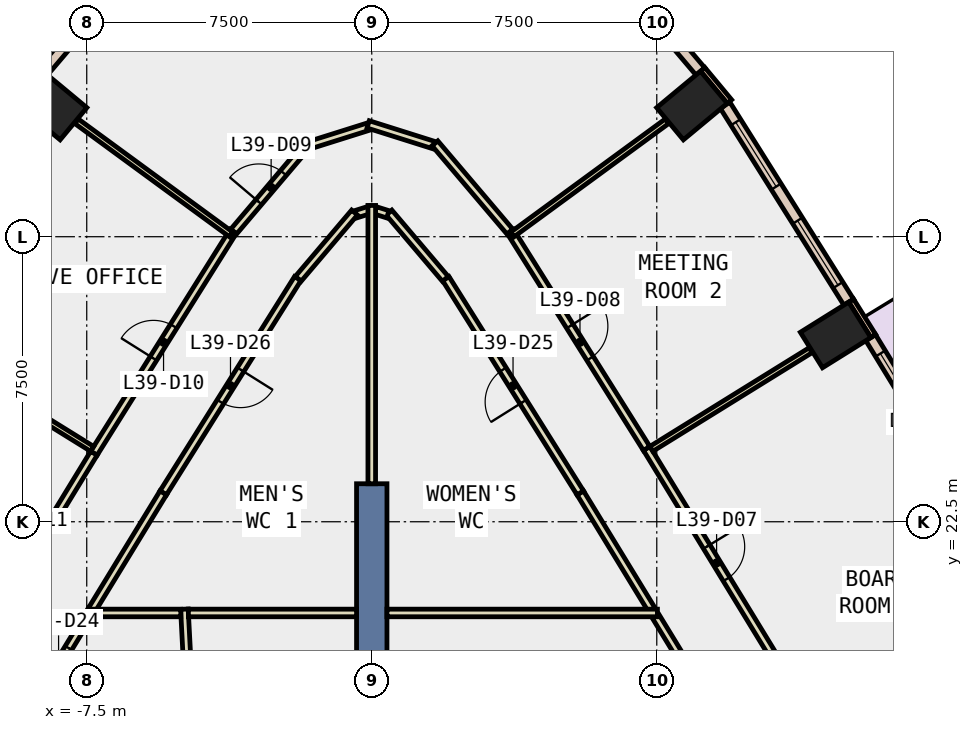
"""IFC4 building model, lengths in metres.
Left out: names, types, materials, properties, quantities, classifications, styles, units other than length and angle.
Written with IfcOpenShell. Run it as: python <this file> out.ifc"""

import sys

from ifc_helpers import new_model, si_unit, direction, frame, frame_2d, origin, origin_2d, place, context, subcontext, project, spatial, rectangle, extrude, element, fill, save


model = new_model("IFC4")
c1 = context("Model", 3, precision=1e-05, world=origin(), true_north=direction((0.0, 1.0)))
c2 = subcontext(c1, "Body", "Model", "MODEL_VIEW")
j1 = project(units=[si_unit("LENGTHUNIT", "METRE"), si_unit("PLANEANGLEUNIT", "RADIAN")], contexts=[c1])
p1 = place(None, origin())
s1 = spatial("IfcSite", under=j1, at=p1, CompositionType="ELEMENT")
p2 = place(p1, origin())
s2 = spatial("IfcBuilding", under=s1, at=p2, CompositionType="ELEMENT")
p3 = place(p2, frame((0.0, 0.0, 176.0)))
s3 = spatial("IfcBuildingStorey", under=s2, at=p3, CompositionType="ELEMENT", Elevation=176.0)
for number, where, z_axis, x_axis in (
    (1, (12.206, 27.416, -0.4), (0.0, 0.0, 1.0), (-0.53, 0.848, 0.0)),
    (2, (8.426, 33.452, -0.4), (0.0, 0.0, 1.0), (-0.639, 0.769, 0.0)),
    (3, (-8.426, 33.452, -0.4), (0.0, 0.0, 1.0), (0.639, 0.769, 0.0)),
):
    element("IfcColumn", number, at=place(p3, frame(where, z_axis=z_axis, x_axis=x_axis)), inside=s3, PredefinedType="COLUMN", context=c2, shape_type="SweptSolid", body=[
        extrude(rectangle(XDim=1.1, YDim=1.5, at=origin_2d()), origin(), (0.0, 0.0, 1.0), 4.2),
    ])
p4 = place(p3, frame((0.0, 14.5, -0.4), z_axis=(0.0, 0.0, 1.0), x_axis=(0.0, 1.0, 0.0)))
e4 = element("IfcWall", 4, at=p4, inside=s3, PredefinedType="SHEAR", context=c2, shape_type="SweptSolid", body=[
    extrude(rectangle(XDim=9.0, YDim=0.8, at=frame_2d((4.5, 0.0))), origin(), (0.0, 0.0, 1.0), 4.2),
])
p5 = place(p3, frame((13.197, 27.387, 0.0), z_axis=(0.0, 0.0, 1.0), x_axis=(-0.529879262372, 0.848073090782, 0.0)))
e5 = element("IfcWall", 5, at=p5, inside=s3, PredefinedType="STANDARD", context=c2, shape_type="SweptSolid", body=[
    extrude(rectangle(XDim=1.1, YDim=0.15, at=frame_2d((0.55, 0.0))), origin(), (0.0, 0.0, 1.0), 3.8),
])
p6 = place(p3, frame((9.412, 33.556, 0.0), z_axis=(0.0, 0.0, 1.0), x_axis=(-0.639092407347, 0.769129959676, 0.0)))
e6 = element("IfcWall", 6, at=p6, inside=s3, PredefinedType="STANDARD", context=c2, shape_type="SweptSolid", body=[
    extrude(rectangle(XDim=1.1, YDim=0.15, at=frame_2d((0.55, 0.0))), origin(), (0.0, 0.0, 1.0), 3.8),
])
p7 = place(p3, frame((16.24, 22.25, 0.0), z_axis=(0.0, 0.0, 1.0), x_axis=(-0.521263083766, 0.8533960379, 0.0)))
e7 = element("IfcWall", 7, at=p7, inside=s3, PredefinedType="STANDARD", context=c2, shape_type="SweptSolid", body=[
    extrude(rectangle(XDim=5.97, YDim=0.3, at=frame_2d((2.985, 0.0))), origin(), (0.0, 0.0, 1.0), 3.8),
])
p8 = place(p7, frame((0.493, 0.0, 0.0)))
e8 = element("IfcOpeningElement", 8, at=p8, cuts=e7, PredefinedType="OPENING", context=c2, shape_type="SweptSolid", body=[
    extrude(rectangle(XDim=2.0, YDim=2.4, at=frame_2d((1.0, 1.2))), frame((0.0, 0.16, 0.0), z_axis=(0.0, -1.0, 0.0), x_axis=(1.0, 0.0, 0.0)), (0.0, 0.0, 1.0), 0.32),
])
p9 = place(p7, frame((3.478, 0.0, 0.9)))
e9 = element("IfcOpeningElement", 9, at=p9, cuts=e7, PredefinedType="OPENING", context=c2, shape_type="SweptSolid", body=[
    extrude(rectangle(XDim=2.0, YDim=2.6, at=frame_2d((1.0, 1.3))), frame((0.0, 0.16, 0.0), z_axis=(0.0, -1.0, 0.0), x_axis=(1.0, 0.0, 0.0)), (0.0, 0.0, 1.0), 0.32),
])
p10 = place(p3, frame((12.55, 28.279, 0.0), z_axis=(0.0, 0.0, 1.0), x_axis=(-0.531816047834, 0.846859900613, 0.0)))
e10 = element("IfcWall", 10, at=p10, inside=s3, PredefinedType="STANDARD", context=c2, shape_type="SweptSolid", body=[
    extrude(rectangle(XDim=6.119, YDim=0.3, at=frame_2d((3.06, 0.0))), origin(), (0.0, 0.0, 1.0), 3.8),
])
p11 = place(p10, frame((0.53, 0.0, 0.9)))
e11 = element("IfcOpeningElement", 11, at=p11, cuts=e10, PredefinedType="OPENING", context=c2, shape_type="SweptSolid", body=[
    extrude(rectangle(XDim=2.0, YDim=2.6, at=frame_2d((1.0, 1.3))), frame((0.0, 0.16, 0.0), z_axis=(0.0, -1.0, 0.0), x_axis=(1.0, 0.0, 0.0)), (0.0, 0.0, 1.0), 0.32),
])
p12 = place(p10, frame((3.589, 0.0, 0.9)))
e12 = element("IfcOpeningElement", 12, at=p12, cuts=e10, PredefinedType="OPENING", context=c2, shape_type="SweptSolid", body=[
    extrude(rectangle(XDim=2.0, YDim=2.6, at=frame_2d((1.0, 1.3))), frame((0.0, 0.16, 0.0), z_axis=(0.0, -1.0, 0.0), x_axis=(1.0, 0.0, 0.0)), (0.0, 0.0, 1.0), 0.32),
])
p13 = place(p3, frame((8.647, 34.35, 0.0), z_axis=(0.0, 0.0, 1.0), x_axis=(-0.647156077277, 0.76235753531, 0.0)))
e13 = element("IfcWall", 13, at=p13, inside=s3, PredefinedType="STANDARD", context=c2, shape_type="SweptSolid", body=[
    extrude(rectangle(XDim=4.262, YDim=0.3, at=frame_2d((2.131, 0.0))), origin(), (0.0, 0.0, 1.0), 3.8),
])
p14 = place(p13, frame((1.431, 0.0, 0.9)))
e14 = element("IfcOpeningElement", 14, at=p14, cuts=e13, PredefinedType="OPENING", context=c2, shape_type="SweptSolid", body=[
    extrude(rectangle(XDim=1.4, YDim=2.6, at=frame_2d((0.7, 1.3))), frame((0.0, 0.16, 0.0), z_axis=(0.0, -1.0, 0.0), x_axis=(1.0, 0.0, 0.0)), (0.0, 0.0, 1.0), 0.32),
])
p15 = place(p3, frame((-5.889, 37.599, 0.0), z_axis=(0.0, 0.0, 1.0), x_axis=(-0.647156077277, -0.76235753531, 0.0)))
e15 = element("IfcWall", 15, at=p15, inside=s3, PredefinedType="STANDARD", context=c2, shape_type="SweptSolid", body=[
    extrude(rectangle(XDim=4.262, YDim=0.3, at=frame_2d((2.131, 0.0))), origin(), (0.0, 0.0, 1.0), 3.8),
])
p16 = place(p15, frame((1.431, 0.0, 0.9)))
e16 = element("IfcOpeningElement", 16, at=p16, cuts=e15, PredefinedType="OPENING", context=c2, shape_type="SweptSolid", body=[
    extrude(rectangle(XDim=1.4, YDim=2.6, at=frame_2d((0.7, 1.3))), frame((0.0, 0.16, 0.0), z_axis=(0.0, -1.0, 0.0), x_axis=(1.0, 0.0, 0.0)), (0.0, 0.0, 1.0), 0.32),
])
p17 = place(p3, frame((9.116, 17.319, 0.0), z_axis=(0.0, 0.0, 1.0), x_axis=(-0.521343721083, 0.853346778565, 0.0)))
e17 = element("IfcWall", 17, at=p17, inside=s3, PredefinedType="PARTITIONING", context=c2, shape_type="SweptSolid", body=[
    extrude(rectangle(XDim=3.159, YDim=0.2, at=frame_2d((1.58, 0.0))), origin(), (0.0, 0.0, 1.0), 3.75),
])
p18 = place(p3, frame((-7.365, 20.185, 0.0), z_axis=(0.0, 0.0, 1.0), x_axis=(-0.521352973407, -0.853341125881, 0.0)))
e18 = element("IfcWall", 18, at=p18, inside=s3, PredefinedType="PARTITIONING", context=c2, shape_type="SweptSolid", body=[
    extrude(rectangle(XDim=3.359, YDim=0.2, at=frame_2d((1.679, 0.0))), origin(), (0.0, 0.0, 1.0), 3.75),
])
p19 = place(p18, frame((1.18, 0.0, 0.0)))
e19 = element("IfcOpeningElement", 19, at=p19, cuts=e18, PredefinedType="OPENING", context=c2, shape_type="SweptSolid", body=[
    extrude(rectangle(XDim=1.0, YDim=2.1, at=frame_2d((0.5, 1.05))), frame((0.0, 0.11, 0.0), z_axis=(0.0, -1.0, 0.0), x_axis=(1.0, 0.0, 0.0)), (0.0, 0.0, 1.0), 0.22),
])
p20 = place(p3, frame((7.365, 20.185, 0.0), z_axis=(0.0, 0.0, 1.0), x_axis=(-0.521206053955, 0.853430869679, 0.0)))
e20 = element("IfcWall", 20, at=p20, inside=s3, PredefinedType="PARTITIONING", context=c2, shape_type="SweptSolid", body=[
    extrude(rectangle(XDim=3.603, YDim=0.2, at=frame_2d((1.802, 0.0))), origin(), (0.0, 0.0, 1.0), 3.75),
])
p21 = place(p3, frame((5.487, 23.26, 0.0), z_axis=(0.0, 0.0, 1.0), x_axis=(-0.531656179122, 0.846960274866, 0.0)))
e21 = element("IfcWall", 21, at=p21, inside=s3, PredefinedType="PARTITIONING", context=c2, shape_type="SweptSolid", body=[
    extrude(rectangle(XDim=6.657, YDim=0.2, at=frame_2d((3.328, 0.0))), origin(), (0.0, 0.0, 1.0), 3.75),
])
p22 = place(p21, frame((2.828, 0.0, 0.0)))
e22 = element("IfcOpeningElement", 22, at=p22, cuts=e21, PredefinedType="OPENING", context=c2, shape_type="SweptSolid", body=[
    extrude(rectangle(XDim=1.0, YDim=2.1, at=frame_2d((0.5, 1.05))), frame((0.0, 0.11, 0.0), z_axis=(0.0, -1.0, 0.0), x_axis=(1.0, 0.0, 0.0)), (0.0, 0.0, 1.0), 0.22),
])
p23 = place(p3, frame((1.936, 28.89, 0.0), z_axis=(0.0, 0.0, 1.0), x_axis=(-0.647388540773, 0.762160138866, 0.0)))
e23 = element("IfcWall", 23, at=p23, inside=s3, PredefinedType="PARTITIONING", context=c2, shape_type="SweptSolid", body=[
    extrude(rectangle(XDim=2.291, YDim=0.2, at=frame_2d((1.146, 0.0))), origin(), (0.0, 0.0, 1.0), 3.75),
])
p24 = place(p3, frame((0.423, 30.59, 0.0), z_axis=(0.0, 0.0, 1.0), x_axis=(-0.954074901128, 0.29956816092, 0.0)))
e24 = element("IfcWall", 24, at=p24, inside=s3, PredefinedType="PARTITIONING", context=c2, shape_type="SweptSolid", body=[
    extrude(rectangle(XDim=0.344, YDim=0.2, at=frame_2d((0.172, 0.0))), origin(), (0.0, 0.0, 1.0), 3.75),
])
p25 = place(p3, frame((-0.048, 30.708, 0.0), z_axis=(0.0, 0.0, 1.0), x_axis=(-0.953948026088, -0.299971937891, 0.0)))
e25 = element("IfcWall", 25, at=p25, inside=s3, PredefinedType="PARTITIONING", context=c2, shape_type="SweptSolid", body=[
    extrude(rectangle(XDim=0.393, YDim=0.2, at=frame_2d((0.197, 0.0))), origin(), (0.0, 0.0, 1.0), 3.75),
])
p26 = place(p3, frame((-0.453, 30.636, 0.0), z_axis=(0.0, 0.0, 1.0), x_axis=(-0.647388540773, -0.762160138866, 0.0)))
e26 = element("IfcWall", 26, at=p26, inside=s3, PredefinedType="PARTITIONING", context=c2, shape_type="SweptSolid", body=[
    extrude(rectangle(XDim=2.291, YDim=0.2, at=frame_2d((1.146, 0.0))), origin(), (0.0, 0.0, 1.0), 3.75),
])
p27 = place(p3, frame((-1.948, 28.898, 0.0), z_axis=(0.0, 0.0, 1.0), x_axis=(-0.531656179122, -0.846960274866, 0.0)))
e27 = element("IfcWall", 27, at=p27, inside=s3, PredefinedType="PARTITIONING", context=c2, shape_type="SweptSolid", body=[
    extrude(rectangle(XDim=6.657, YDim=0.2, at=frame_2d((3.328, 0.0))), origin(), (0.0, 0.0, 1.0), 3.75),
])
p28 = place(p27, frame((2.828, 0.0, 0.0)))
e28 = element("IfcOpeningElement", 28, at=p28, cuts=e27, PredefinedType="OPENING", context=c2, shape_type="SweptSolid", body=[
    extrude(rectangle(XDim=1.0, YDim=2.1, at=frame_2d((0.5, 1.05))), frame((0.0, 0.11, 0.0), z_axis=(0.0, -1.0, 0.0), x_axis=(1.0, 0.0, 0.0)), (0.0, 0.0, 1.0), 0.22),
])
p29 = place(p3, frame((-5.487, 23.26, 0.0), z_axis=(0.0, 0.0, 1.0), x_axis=(-0.521206053955, -0.853430869679, 0.0)))
e29 = element("IfcWall", 29, at=p29, inside=s3, PredefinedType="PARTITIONING", context=c2, shape_type="SweptSolid", body=[
    extrude(rectangle(XDim=3.603, YDim=0.2, at=frame_2d((1.802, 0.0))), origin(), (0.0, 0.0, 1.0), 3.75),
])
p30 = place(p3, frame((7.234, 24.43, 0.0), z_axis=(0.0, 0.0, 1.0), x_axis=(0.521189922749, -0.853440721096, 0.0)))
e30 = element("IfcWall", 30, at=p30, inside=s3, PredefinedType="PARTITIONING", context=c2, shape_type="SweptSolid", body=[
    extrude(rectangle(XDim=7.063, YDim=0.2, at=frame_2d((3.531, 0.0))), origin(), (0.0, 0.0, 1.0), 3.75),
])
p31 = place(p30, frame((3.031, 0.0, 0.0)))
e31 = element("IfcOpeningElement", 31, at=p31, cuts=e30, PredefinedType="OPENING", context=c2, shape_type="SweptSolid", body=[
    extrude(rectangle(XDim=1.0, YDim=2.1, at=frame_2d((0.5, 1.05))), frame((0.0, 0.11, 0.0), z_axis=(0.0, -1.0, 0.0), x_axis=(1.0, 0.0, 0.0)), (0.0, 0.0, 1.0), 0.22),
])
p32 = place(p3, frame((3.646, 30.142, 0.0), z_axis=(0.0, 0.0, 1.0), x_axis=(0.531621424046, -0.846982090422, 0.0)))
e32 = element("IfcWall", 32, at=p32, inside=s3, PredefinedType="PARTITIONING", context=c2, shape_type="SweptSolid", body=[
    extrude(rectangle(XDim=6.745, YDim=0.2, at=frame_2d((3.373, 0.0))), origin(), (0.0, 0.0, 1.0), 3.75),
])
p33 = place(p32, frame((2.948, 0.0, 0.0)))
e33 = element("IfcOpeningElement", 33, at=p33, cuts=e32, PredefinedType="OPENING", context=c2, shape_type="SweptSolid", body=[
    extrude(rectangle(XDim=1.0, YDim=2.1, at=frame_2d((0.5, 1.05))), frame((0.0, 0.11, 0.0), z_axis=(0.0, -1.0, 0.0), x_axis=(1.0, 0.0, 0.0)), (0.0, 0.0, 1.0), 0.22),
])
p34 = place(p3, frame((-3.634, 30.134, 0.0), z_axis=(0.0, 0.0, 1.0), x_axis=(0.647148242723, 0.762364185899, 0.0)))
e34 = element("IfcWall", 34, at=p34, inside=s3, PredefinedType="PARTITIONING", context=c2, shape_type="SweptSolid", body=[
    extrude(rectangle(XDim=3.047, YDim=0.2, at=frame_2d((1.523, 0.0))), origin(), (0.0, 0.0, 1.0), 3.75),
])
p35 = place(p34, frame((1.024, 0.0, 0.0)))
e35 = element("IfcOpeningElement", 35, at=p35, cuts=e34, PredefinedType="OPENING", context=c2, shape_type="SweptSolid", body=[
    extrude(rectangle(XDim=1.0, YDim=2.1, at=frame_2d((0.5, 1.05))), frame((0.0, 0.11, 0.0), z_axis=(0.0, -1.0, 0.0), x_axis=(1.0, 0.0, 0.0)), (0.0, 0.0, 1.0), 0.22),
])
p36 = place(p3, frame((-1.632, 32.411, 0.0), z_axis=(0.0, 0.0, 1.0), x_axis=(0.953809064266, 0.300413496575, 0.0)))
e36 = element("IfcWall", 36, at=p36, inside=s3, PredefinedType="PARTITIONING", context=c2, shape_type="SweptSolid", body=[
    extrude(rectangle(XDim=1.612, YDim=0.2, at=frame_2d((0.806, 0.0))), origin(), (0.0, 0.0, 1.0), 3.75),
])
p37 = place(p3, frame((-0.095, 32.956, 0.0), z_axis=(0.0, 0.0, 1.0), x_axis=(0.953617294109, -0.301021687552, 0.0)))
e37 = element("IfcWall", 37, at=p37, inside=s3, PredefinedType="PARTITIONING", context=c2, shape_type="SweptSolid", body=[
    extrude(rectangle(XDim=1.811, YDim=0.2, at=frame_2d((0.906, 0.0))), origin(), (0.0, 0.0, 1.0), 3.75),
])
p38 = place(p3, frame((1.662, 32.457, 0.0), z_axis=(0.0, 0.0, 1.0), x_axis=(0.647148242723, -0.762364185899, 0.0)))
e38 = element("IfcWall", 38, at=p38, inside=s3, PredefinedType="PARTITIONING", context=c2, shape_type="SweptSolid", body=[
    extrude(rectangle(XDim=3.047, YDim=0.2, at=frame_2d((1.523, 0.0))), origin(), (0.0, 0.0, 1.0), 3.75),
])
p39 = place(p3, frame((-7.312, 24.302, 0.0), z_axis=(0.0, 0.0, 1.0), x_axis=(0.53166241737, 0.846956358944, 0.0)))
e39 = element("IfcWall", 39, at=p39, inside=s3, PredefinedType="PARTITIONING", context=c2, shape_type="SweptSolid", body=[
    extrude(rectangle(XDim=6.895, YDim=0.2, at=frame_2d((3.448, 0.0))), origin(), (0.0, 0.0, 1.0), 3.75),
])
p40 = place(p39, frame((2.948, 0.0, 0.0)))
e40 = element("IfcOpeningElement", 40, at=p40, cuts=e39, PredefinedType="OPENING", context=c2, shape_type="SweptSolid", body=[
    extrude(rectangle(XDim=1.0, YDim=2.1, at=frame_2d((0.5, 1.05))), frame((0.0, 0.11, 0.0), z_axis=(0.0, -1.0, 0.0), x_axis=(1.0, 0.0, 0.0)), (0.0, 0.0, 1.0), 0.22),
])
p41 = place(p3, frame((-10.915, 18.402, 0.0), z_axis=(0.0, 0.0, 1.0), x_axis=(0.521189997761, 0.853440675287, 0.0)))
e41 = element("IfcWall", 41, at=p41, inside=s3, PredefinedType="PARTITIONING", context=c2, shape_type="SweptSolid", body=[
    extrude(rectangle(XDim=6.913, YDim=0.2, at=frame_2d((3.457, 0.0))), origin(), (0.0, 0.0, 1.0), 3.75),
])
p42 = place(p41, frame((3.031, 0.0, 0.0)))
e42 = element("IfcOpeningElement", 42, at=p42, cuts=e41, PredefinedType="OPENING", context=c2, shape_type="SweptSolid", body=[
    extrude(rectangle(XDim=1.0, YDim=2.1, at=frame_2d((0.5, 1.05))), frame((0.0, 0.11, 0.0), z_axis=(0.0, -1.0, 0.0), x_axis=(1.0, 0.0, 0.0)), (0.0, 0.0, 1.0), 0.22),
])
p43 = place(p3, frame((-4.632, 14.488, 0.0), z_axis=(0.0, 0.0, 1.0), x_axis=(-0.052074913706, 0.998643181203, 0.0)))
e43 = element("IfcWall", 43, at=p43, inside=s3, PredefinedType="PARTITIONING", context=c2, shape_type="SweptSolid", body=[
    extrude(rectangle(XDim=5.72, YDim=0.2, at=frame_2d((2.86, 0.0))), origin(), (0.0, 0.0, 1.0), 3.75),
])
p44 = place(p3, frame((0.4, 20.1, 0.0), z_axis=(0.0, 0.0, 1.0), x_axis=(1.0, 0.0, 0.0)))
e44 = element("IfcWall", 44, at=p44, inside=s3, PredefinedType="PARTITIONING", context=c2, shape_type="SweptSolid", body=[
    extrude(rectangle(XDim=7.117, YDim=0.2, at=frame_2d((3.559, 0.0))), origin(), (0.0, 0.0, 1.0), 3.75),
])
p45 = place(p3, frame((-4.825, 20.1, 0.0), z_axis=(0.0, 0.0, 1.0), x_axis=(1.0, 0.0, 0.0)))
e45 = element("IfcWall", 45, at=p45, inside=s3, PredefinedType="PARTITIONING", context=c2, shape_type="SweptSolid", body=[
    extrude(rectangle(XDim=4.425, YDim=0.2, at=frame_2d((2.212, 0.0))), origin(), (0.0, 0.0, 1.0), 3.75),
])
p46 = place(p3, frame((-7.317, 20.1, 0.0), z_axis=(0.0, 0.0, 1.0), x_axis=(1.0, 0.0, 0.0)))
e46 = element("IfcWall", 46, at=p46, inside=s3, PredefinedType="PARTITIONING", context=c2, shape_type="SweptSolid", body=[
    extrude(rectangle(XDim=2.292, YDim=0.2, at=frame_2d((1.146, 0.0))), origin(), (0.0, 0.0, 1.0), 3.75),
])
p47 = place(p3, frame((0.0, 23.5, 0.0), z_axis=(0.0, 0.0, 1.0), x_axis=(0.0, 1.0, 0.0)))
e47 = element("IfcWall", 47, at=p47, inside=s3, PredefinedType="PARTITIONING", context=c2, shape_type="SweptSolid", body=[
    extrude(rectangle(XDim=7.323, YDim=0.2, at=frame_2d((3.662, 0.0))), origin(), (0.0, 0.0, 1.0), 3.75),
])
p48 = place(p3, frame((7.358, 24.418, 0.0), z_axis=(0.0, 0.0, 1.0), x_axis=(0.850136365231, 0.526562589358, 0.0)))
e48 = element("IfcWall", 48, at=p48, inside=s3, PredefinedType="PARTITIONING", context=c2, shape_type="SweptSolid", body=[
    extrude(rectangle(XDim=4.93, YDim=0.15, at=frame_2d((2.465, 0.0))), origin(), (0.0, 0.0, 1.0), 3.75),
])
for number, where, z_axis, x_axis in (
    (49, (3.699, 30.058, 0.0), (0.0, 0.0, 1.0), (0.807, 0.591, 0.0)),
    (50, (-3.699, 30.058, 0.0), (0.0, 0.0, 1.0), (-0.807, 0.591, 0.0)),
):
    element("IfcWall", number, at=place(p3, frame(where, z_axis=z_axis, x_axis=x_axis)), inside=s3, PredefinedType="PARTITIONING", context=c2, shape_type="SweptSolid", body=[
        extrude(rectangle(XDim=5.044, YDim=0.15, at=frame_2d((2.522, 0.0))), origin(), (0.0, 0.0, 1.0), 3.75),
    ])
p49 = place(p3, frame((-7.358, 24.418, 0.0), z_axis=(0.0, 0.0, 1.0), x_axis=(-0.850136365231, 0.526562589358, 0.0)))
e51 = element("IfcWall", 51, at=p49, inside=s3, PredefinedType="PARTITIONING", context=c2, shape_type="SweptSolid", body=[
    extrude(rectangle(XDim=4.93, YDim=0.15, at=frame_2d((2.465, 0.0))), origin(), (0.0, 0.0, 1.0), 3.75),
])
p50 = place(p9, origin())
e52 = element("IfcWindow", 52, at=p50, inside=s3, PartitioningType="SINGLE_PANEL", PredefinedType="WINDOW", context=c2, shape_type="SweptSolid", body=[
    extrude(rectangle(XDim=2.0, YDim=2.6, at=frame_2d((1.0, 1.3))), frame((0.0, 0.03, 0.0), z_axis=(0.0, -1.0, 0.0), x_axis=(1.0, 0.0, 0.0)), (0.0, 0.0, 1.0), 0.06),
])
fill(e9, e52)
p51 = place(p11, origin())
e53 = element("IfcWindow", 53, at=p51, inside=s3, PartitioningType="SINGLE_PANEL", PredefinedType="WINDOW", context=c2, shape_type="SweptSolid", body=[
    extrude(rectangle(XDim=2.0, YDim=2.6, at=frame_2d((1.0, 1.3))), frame((0.0, 0.03, 0.0), z_axis=(0.0, -1.0, 0.0), x_axis=(1.0, 0.0, 0.0)), (0.0, 0.0, 1.0), 0.06),
])
fill(e11, e53)
p52 = place(p12, origin())
e54 = element("IfcWindow", 54, at=p52, inside=s3, PartitioningType="SINGLE_PANEL", PredefinedType="WINDOW", context=c2, shape_type="SweptSolid", body=[
    extrude(rectangle(XDim=2.0, YDim=2.6, at=frame_2d((1.0, 1.3))), frame((0.0, 0.03, 0.0), z_axis=(0.0, -1.0, 0.0), x_axis=(1.0, 0.0, 0.0)), (0.0, 0.0, 1.0), 0.06),
])
fill(e12, e54)
p53 = place(p31, origin())
e55 = element("IfcDoor", 55, at=p53, inside=s3, OperationType="SINGLE_SWING_RIGHT", PredefinedType="DOOR", context=c2, shape_type="SweptSolid", body=[
    extrude(rectangle(XDim=1.0, YDim=2.1, at=frame_2d((0.5, 1.05))), frame((0.0, 0.025, 0.0), z_axis=(0.0, -1.0, 0.0), x_axis=(1.0, 0.0, 0.0)), (0.0, 0.0, 1.0), 0.05),
])
fill(e31, e55)
p54 = place(p33, origin())
e56 = element("IfcDoor", 56, at=p54, inside=s3, OperationType="SINGLE_SWING_LEFT", PredefinedType="DOOR", context=c2, shape_type="SweptSolid", body=[
    extrude(rectangle(XDim=1.0, YDim=2.1, at=frame_2d((0.5, 1.05))), frame((0.0, 0.025, 0.0), z_axis=(0.0, -1.0, 0.0), x_axis=(1.0, 0.0, 0.0)), (0.0, 0.0, 1.0), 0.05),
])
fill(e33, e56)
p55 = place(p35, origin())
e57 = element("IfcDoor", 57, at=p55, inside=s3, OperationType="SINGLE_SWING_LEFT", PredefinedType="DOOR", context=c2, shape_type="SweptSolid", body=[
    extrude(rectangle(XDim=1.0, YDim=2.1, at=frame_2d((0.5, 1.05))), frame((0.0, 0.025, 0.0), z_axis=(0.0, -1.0, 0.0), x_axis=(1.0, 0.0, 0.0)), (0.0, 0.0, 1.0), 0.05),
])
fill(e35, e57)
p56 = place(p40, origin())
e58 = element("IfcDoor", 58, at=p56, inside=s3, OperationType="SINGLE_SWING_LEFT", PredefinedType="DOOR", context=c2, shape_type="SweptSolid", body=[
    extrude(rectangle(XDim=1.0, YDim=2.1, at=frame_2d((0.5, 1.05))), frame((0.0, 0.025, 0.0), z_axis=(0.0, -1.0, 0.0), x_axis=(1.0, 0.0, 0.0)), (0.0, 0.0, 1.0), 0.05),
])
fill(e40, e58)
p57 = place(p19, origin())
e59 = element("IfcDoor", 59, at=p57, inside=s3, OperationType="SINGLE_SWING_LEFT", PredefinedType="DOOR", context=c2, shape_type="SweptSolid", body=[
    extrude(rectangle(XDim=1.0, YDim=2.1, at=frame_2d((0.5, 1.05))), frame((0.0, 0.025, 0.0), z_axis=(0.0, -1.0, 0.0), x_axis=(1.0, 0.0, 0.0)), (0.0, 0.0, 1.0), 0.05),
])
fill(e19, e59)
p58 = place(p22, origin())
e60 = element("IfcDoor", 60, at=p58, inside=s3, OperationType="SINGLE_SWING_LEFT", PredefinedType="DOOR", context=c2, shape_type="SweptSolid", body=[
    extrude(rectangle(XDim=1.0, YDim=2.1, at=frame_2d((0.5, 1.05))), frame((0.0, 0.025, 0.0), z_axis=(0.0, -1.0, 0.0), x_axis=(1.0, 0.0, 0.0)), (0.0, 0.0, 1.0), 0.05),
])
fill(e22, e60)
p59 = place(p28, origin())
e61 = element("IfcDoor", 61, at=p59, inside=s3, OperationType="SINGLE_SWING_LEFT", PredefinedType="DOOR", context=c2, shape_type="SweptSolid", body=[
    extrude(rectangle(XDim=1.0, YDim=2.1, at=frame_2d((0.5, 1.05))), frame((0.0, 0.025, 0.0), z_axis=(0.0, -1.0, 0.0), x_axis=(1.0, 0.0, 0.0)), (0.0, 0.0, 1.0), 0.05),
])
fill(e28, e61)
save(model, sys.argv[1])
